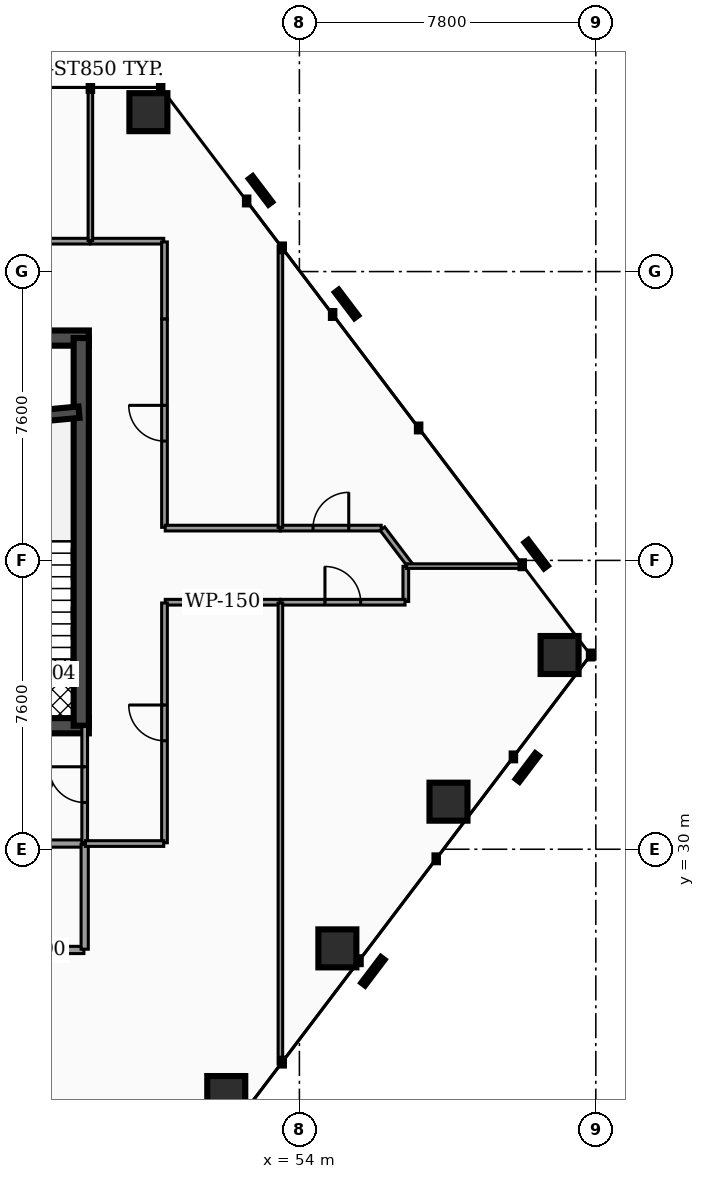
"""IFC4 building model, lengths in metres.
Left out: names, types, materials, properties, quantities, classifications, styles, units other than length and angle.
Written with IfcOpenShell. Run it as: python <this file> out.ifc"""

import sys

from ifc_helpers import new_model, si_unit, direction, frame, frame_2d, origin, origin_2d, place, context, subcontext, project, spatial, rectangle, hollow_rectangle, extrude, element, fill, save


model = new_model("IFC4")
c1 = context("Model", 3, precision=1e-05, world=origin(), true_north=direction((0.0, 1.0)))
c2 = subcontext(c1, "Body", "Model", "MODEL_VIEW")
j1 = project(units=[si_unit("LENGTHUNIT", "METRE"), si_unit("PLANEANGLEUNIT", "RADIAN")], contexts=[c1])
p1 = place(None, origin())
s1 = spatial("IfcSite", under=j1, at=p1, CompositionType="ELEMENT")
p2 = place(p1, origin())
s2 = spatial("IfcBuilding", under=s1, at=p2, CompositionType="ELEMENT")
p3 = place(p2, frame((0.0, 0.0, 47.94)))
s3 = spatial("IfcBuildingStorey", under=s2, at=p3, CompositionType="ELEMENT", Elevation=47.94)
p4 = place(p3, frame((28.4, 43.45, 0.0), z_axis=(0.0, 0.0, 1.0), x_axis=(1.0, 0.0, 0.0)))
e1 = element("IfcWall", 1, at=p4, inside=s3, PredefinedType="SHEAR", context=c2, shape_type="SweptSolid", body=[
    extrude(rectangle(XDim=20.06, YDim=0.4, at=frame_2d((10.03, 0.0))), origin(), (0.0, 0.0, 1.0), 3.82),
])
p5 = place(p3, frame((28.4, 33.25, 0.0), z_axis=(0.0, 0.0, 1.0), x_axis=(1.0, 0.0, 0.0)))
e2 = element("IfcWall", 2, at=p5, inside=s3, PredefinedType="SHEAR", context=c2, shape_type="SweptSolid", body=[
    extrude(rectangle(XDim=20.06, YDim=0.4, at=frame_2d((10.03, 0.0))), origin(), (0.0, 0.0, 1.0), 3.82),
])
p6 = place(p5, frame((4.03, 0.0, 0.0)))
e3 = element("IfcOpeningElement", 3, at=p6, cuts=e2, PredefinedType="OPENING", context=c2, shape_type="SweptSolid", body=[
    extrude(rectangle(XDim=1.1, YDim=2.15, at=frame_2d((0.55, 1.075))), frame((0.0, 0.21, 0.0), z_axis=(0.0, -1.0, 0.0), x_axis=(1.0, 0.0, 0.0)), (0.0, 0.0, 1.0), 0.42),
])
p7 = place(p5, frame((14.87, 0.0, 0.0)))
e4 = element("IfcOpeningElement", 4, at=p7, cuts=e2, PredefinedType="OPENING", context=c2, shape_type="SweptSolid", body=[
    extrude(rectangle(XDim=1.1, YDim=2.15, at=frame_2d((0.55, 1.075))), frame((0.0, 0.21, 0.0), z_axis=(0.0, -1.0, 0.0), x_axis=(1.0, 0.0, 0.0)), (0.0, 0.0, 1.0), 0.42),
])
p8 = place(p5, frame((1.31, 0.0, 0.0)))
e5 = element("IfcOpeningElement", 5, at=p8, cuts=e2, PredefinedType="OPENING", context=c2, shape_type="SweptSolid", body=[
    extrude(rectangle(XDim=1.1, YDim=2.2, at=frame_2d((0.55, 1.1))), frame((0.0, 0.21, 0.0), z_axis=(0.0, -1.0, 0.0), x_axis=(1.0, 0.0, 0.0)), (0.0, 0.0, 1.0), 0.42),
])
p9 = place(p5, frame((9.44, 0.0, 0.0)))
e6 = element("IfcOpeningElement", 6, at=p9, cuts=e2, PredefinedType="OPENING", context=c2, shape_type="SweptSolid", body=[
    extrude(rectangle(XDim=1.12, YDim=2.05, at=frame_2d((0.56, 1.025))), frame((0.0, 0.21, 0.0), z_axis=(0.0, -1.0, 0.0), x_axis=(1.0, 0.0, 0.0)), (0.0, 0.0, 1.0), 0.42),
])
p10 = place(p5, frame((17.65, 0.0, 0.0)))
e7 = element("IfcOpeningElement", 7, at=p10, cuts=e2, PredefinedType="OPENING", context=c2, shape_type="SweptSolid", body=[
    extrude(rectangle(XDim=1.1, YDim=2.2, at=frame_2d((0.55, 1.1))), frame((0.0, 0.21, 0.0), z_axis=(0.0, -1.0, 0.0), x_axis=(1.0, 0.0, 0.0)), (0.0, 0.0, 1.0), 0.42),
])
p11 = place(p3, frame((48.26, 33.25, 0.0), z_axis=(0.0, 0.0, 1.0), x_axis=(0.0, 1.0, 0.0)))
e8 = element("IfcWall", 8, at=p11, inside=s3, PredefinedType="SHEAR", context=c2, shape_type="SweptSolid", body=[
    extrude(rectangle(XDim=10.2, YDim=0.4, at=frame_2d((5.1, 0.0))), origin(), (0.0, 0.0, 1.0), 3.82),
])
p12 = place(p3, frame((44.98, 41.2, 0.0), z_axis=(0.0, 0.0, 1.0), x_axis=(0.995686468965, 0.09278176286, 0.0)))
e9 = element("IfcWall", 9, at=p12, inside=s3, PredefinedType="SHEAR", context=c2, shape_type="SweptSolid", body=[
    extrude(rectangle(XDim=3.234, YDim=0.3, at=frame_2d((1.617, 0.0))), origin(), (0.0, 0.0, 1.0), 3.82),
])
p13 = place(p3, frame((50.026, 49.394, 0.0), z_axis=(0.14189700724, -0.030162599133, 0.989421779096), x_axis=(0.207921314521, 0.978145555103, 0.0)))
e10 = element("IfcColumn", 10, at=p13, inside=s3, PredefinedType="COLUMN", context=c2, shape_type="SweptSolid", body=[
    extrude(hollow_rectangle(XDim=1.0, YDim=1.0, WallThickness=0.05, at=origin_2d()), origin(), (0.0, 0.0, 1.0), 3.861),
])
p14 = place(p3, frame((52.075, 23.532, 0.0), z_axis=(-0.061492548254, -0.001913668514, 0.99810570802), x_axis=(0.031105273255, -0.999516113915, 0.0)))
e11 = element("IfcColumn", 11, at=p14, inside=s3, PredefinedType="COLUMN", context=c2, shape_type="SweptSolid", body=[
    extrude(hollow_rectangle(XDim=1.0, YDim=1.0, WallThickness=0.05, at=origin_2d()), origin(), (0.0, 0.0, 1.0), 3.827),
])
p15 = place(p3, frame((54.999, 27.392, 0.0), z_axis=(-0.031022365831, 0.038426881133, 0.998779749306), x_axis=(-0.778086956405, -0.628156579423, 0.0)))
e12 = element("IfcColumn", 12, at=p15, inside=s3, PredefinedType="COLUMN", context=c2, shape_type="SweptSolid", body=[
    extrude(hollow_rectangle(XDim=1.0, YDim=1.0, WallThickness=0.05, at=origin_2d()), origin(), (0.0, 0.0, 1.0), 3.825),
])
p16 = place(p3, frame((57.923, 31.251, 0.0), z_axis=(-0.000445987498, 0.078557512188, 0.996909483541), x_axis=(-0.999983885033, -0.005677118569, 0.0)))
e13 = element("IfcColumn", 13, at=p16, inside=s3, PredefinedType="COLUMN", context=c2, shape_type="SweptSolid", body=[
    extrude(hollow_rectangle(XDim=1.0, YDim=1.0, WallThickness=0.05, at=origin_2d()), origin(), (0.0, 0.0, 1.0), 3.832),
])
p17 = place(p3, frame((60.847, 35.111, 0.0), z_axis=(0.029813773145, 0.11817672206, 0.992544911475), x_axis=(-0.969619804891, 0.244616912667, 0.0)))
e14 = element("IfcColumn", 14, at=p17, inside=s3, PredefinedType="COLUMN", context=c2, shape_type="SweptSolid", body=[
    extrude(hollow_rectangle(XDim=1.0, YDim=1.0, WallThickness=0.05, at=origin_2d()), origin(), (0.0, 0.0, 1.0), 3.849),
])
p18 = place(p3, frame((45.385, 30.15, 0.0), z_axis=(0.0, 0.0, 1.0), x_axis=(1.0, 0.0, 0.0)))
e15 = element("IfcWall", 15, at=p18, inside=s3, PredefinedType="PARTITIONING", context=c2, shape_type="SweptSolid", body=[
    extrude(rectangle(XDim=2.945, YDim=0.19, at=frame_2d((1.473, 0.0))), origin(), (0.0, 0.0, 1.0), 2.777),
])
p19 = place(p18, frame((0.913, 0.0, 0.0)))
e16 = element("IfcOpeningElement", 16, at=p19, cuts=e15, PredefinedType="OPENING", context=c2, shape_type="SweptSolid", body=[
    extrude(rectangle(XDim=1.12, YDim=2.05, at=frame_2d((0.56, 1.025))), frame((0.0, 0.105, 0.0), z_axis=(0.0, -1.0, 0.0), x_axis=(1.0, 0.0, 0.0)), (0.0, 0.0, 1.0), 0.21),
])
p20 = place(p3, frame((48.35, 30.17, 0.0), z_axis=(0.0, 0.0, 1.0), x_axis=(0.0, 1.0, 0.0)))
e17 = element("IfcWall", 17, at=p20, inside=s3, PredefinedType="PARTITIONING", context=c2, shape_type="SweptSolid", body=[
    extrude(rectangle(XDim=3.06, YDim=0.15, at=frame_2d((1.53, 0.0))), origin(), (0.0, 0.0, 1.0), 2.777),
])
p21 = place(p20, frame((1.06, 0.0, 0.0)))
e18 = element("IfcOpeningElement", 18, at=p21, cuts=e17, PredefinedType="OPENING", context=c2, shape_type="SweptSolid", body=[
    extrude(rectangle(XDim=0.94, YDim=2.05, at=frame_2d((0.47, 1.025))), frame((0.0, 0.085, 0.0), z_axis=(0.0, -1.0, 0.0), x_axis=(1.0, 0.0, 0.0)), (0.0, 0.0, 1.0), 0.17),
])
p22 = place(p3, frame((45.4, 27.35, 0.0), z_axis=(0.0, 0.0, 1.0), x_axis=(1.0, 0.0, 0.0)))
e19 = element("IfcWall", 19, at=p22, inside=s3, PredefinedType="PARTITIONING", context=c2, shape_type="SweptSolid", body=[
    extrude(rectangle(XDim=2.93, YDim=0.19, at=frame_2d((1.465, 0.0))), origin(), (0.0, 0.0, 1.0), 2.777),
])
p23 = place(p3, frame((48.35, 27.37, 0.0), z_axis=(0.0, 0.0, 1.0), x_axis=(0.0, 1.0, 0.0)))
e20 = element("IfcWall", 20, at=p23, inside=s3, PredefinedType="PARTITIONING", context=c2, shape_type="SweptSolid", body=[
    extrude(rectangle(XDim=2.76, YDim=0.19, at=frame_2d((1.38, 0.0))), origin(), (0.0, 0.0, 1.0), 2.777),
])
p24 = place(p3, frame((50.47, 36.5, 0.0), z_axis=(0.0, 0.0, 1.0), x_axis=(1.0, 0.0, 0.0)))
e21 = element("IfcWall", 21, at=p24, inside=s3, PredefinedType="PARTITIONING", context=c2, shape_type="SweptSolid", body=[
    extrude(rectangle(XDim=3.025, YDim=0.15, at=frame_2d((1.513, 0.0))), origin(), (0.0, 0.0, 1.0), 2.777),
])
p25 = place(p3, frame((50.45, 30.17, 0.0), z_axis=(0.0, 0.0, 1.0), x_axis=(0.0, 1.0, 0.0)))
e22 = element("IfcWall", 22, at=p25, inside=s3, PredefinedType="PARTITIONING", context=c2, shape_type="SweptSolid", body=[
    extrude(rectangle(XDim=6.31, YDim=0.15, at=frame_2d((3.155, 0.0))), origin(), (0.0, 0.0, 1.0), 2.777),
])
p26 = place(p25, frame((2.685, 0.0, 0.0)))
e23 = element("IfcOpeningElement", 23, at=p26, cuts=e22, PredefinedType="OPENING", context=c2, shape_type="SweptSolid", body=[
    extrude(rectangle(XDim=0.94, YDim=2.05, at=frame_2d((0.47, 1.025))), frame((0.0, 0.085, 0.0), z_axis=(0.0, -1.0, 0.0), x_axis=(1.0, 0.0, 0.0)), (0.0, 0.0, 1.0), 0.17),
])
p27 = place(p3, frame((48.37, 30.15, 0.0), z_axis=(0.0, 0.0, 1.0), x_axis=(1.0, 0.0, 0.0)))
e24 = element("IfcWall", 24, at=p27, inside=s3, PredefinedType="PARTITIONING", context=c2, shape_type="SweptSolid", body=[
    extrude(rectangle(XDim=2.06, YDim=0.15, at=frame_2d((1.03, 0.0))), origin(), (0.0, 0.0, 1.0), 2.777),
])
p28 = place(p3, frame((56.8, 36.52, 0.0), z_axis=(0.0, 0.0, 1.0), x_axis=(0.0, 1.0, 0.0)))
e25 = element("IfcWall", 25, at=p28, inside=s3, PredefinedType="PARTITIONING", context=c2, shape_type="SweptSolid", body=[
    extrude(rectangle(XDim=0.925, YDim=0.15, at=frame_2d((0.462, 0.0))), origin(), (0.0, 0.0, 1.0), 2.777),
])
p29 = place(p3, frame((53.505, 36.5, 0.0), z_axis=(0.0, 0.0, 1.0), x_axis=(1.0, 0.0, 0.0)))
e26 = element("IfcWall", 26, at=p29, inside=s3, PredefinedType="PARTITIONING", context=c2, shape_type="SweptSolid", body=[
    extrude(rectangle(XDim=3.275, YDim=0.15, at=frame_2d((1.638, 0.0))), origin(), (0.0, 0.0, 1.0), 2.777),
])
p30 = place(p29, frame((1.167, 0.0, 0.0)))
e27 = element("IfcOpeningElement", 27, at=p30, cuts=e26, PredefinedType="OPENING", context=c2, shape_type="SweptSolid", body=[
    extrude(rectangle(XDim=0.94, YDim=2.05, at=frame_2d((0.47, 1.025))), frame((0.0, 0.085, 0.0), z_axis=(0.0, -1.0, 0.0), x_axis=(1.0, 0.0, 0.0)), (0.0, 0.0, 1.0), 0.17),
])
p31 = place(p3, frame((53.505, 38.45, 0.0), z_axis=(0.0, 0.0, 1.0), x_axis=(1.0, 0.0, 0.0)))
e28 = element("IfcWall", 28, at=p31, inside=s3, PredefinedType="PARTITIONING", context=c2, shape_type="SweptSolid", body=[
    extrude(rectangle(XDim=2.647, YDim=0.15, at=frame_2d((1.324, 0.0))), origin(), (0.0, 0.0, 1.0), 2.777),
])
p32 = place(p31, frame((0.854, 0.0, 0.0)))
e29 = element("IfcOpeningElement", 29, at=p32, cuts=e28, PredefinedType="OPENING", context=c2, shape_type="SweptSolid", body=[
    extrude(rectangle(XDim=0.94, YDim=2.05, at=frame_2d((0.47, 1.025))), frame((0.0, 0.085, 0.0), z_axis=(0.0, -1.0, 0.0), x_axis=(1.0, 0.0, 0.0)), (0.0, 0.0, 1.0), 0.17),
])
p33 = place(p3, frame((56.184, 38.434, 0.0), z_axis=(0.0, 0.0, 1.0), x_axis=(0.603900079305, -0.797060031751, 0.0)))
e30 = element("IfcWall", 30, at=p33, inside=s3, PredefinedType="PARTITIONING", context=c2, shape_type="SweptSolid", body=[
    extrude(rectangle(XDim=1.22, YDim=0.15, at=frame_2d((0.61, 0.0))), origin(), (0.0, 0.0, 1.0), 2.777),
])
p34 = place(p3, frame((48.505, 46.0, 0.0), z_axis=(0.0, 0.0, 1.0), x_axis=(1.0, 0.0, 0.0)))
e31 = element("IfcWall", 31, at=p34, inside=s3, PredefinedType="PARTITIONING", context=c2, shape_type="SweptSolid", body=[
    extrude(rectangle(XDim=1.925, YDim=0.15, at=frame_2d((0.962, 0.0))), origin(), (0.0, 0.0, 1.0), 2.777),
])
p35 = place(p3, frame((50.45, 43.95, 0.0), z_axis=(0.0, 0.0, 1.0), x_axis=(0.0, 1.0, 0.0)))
e32 = element("IfcWall", 32, at=p35, inside=s3, PredefinedType="PARTITIONING", context=c2, shape_type="SweptSolid", body=[
    extrude(rectangle(XDim=2.03, YDim=0.15, at=frame_2d((1.015, 0.0))), origin(), (0.0, 0.0, 1.0), 2.777),
])
p36 = place(p3, frame((50.45, 38.47, 0.0), z_axis=(0.0, 0.0, 1.0), x_axis=(0.0, 1.0, 0.0)))
e33 = element("IfcWall", 33, at=p36, inside=s3, PredefinedType="PARTITIONING", context=c2, shape_type="SweptSolid", body=[
    extrude(rectangle(XDim=5.48, YDim=0.15, at=frame_2d((2.74, 0.0))), origin(), (0.0, 0.0, 1.0), 2.777),
])
p37 = place(p36, frame((2.27, 0.0, 0.0)))
e34 = element("IfcOpeningElement", 34, at=p37, cuts=e33, PredefinedType="OPENING", context=c2, shape_type="SweptSolid", body=[
    extrude(rectangle(XDim=0.94, YDim=2.05, at=frame_2d((0.47, 1.025))), frame((0.0, 0.085, 0.0), z_axis=(0.0, -1.0, 0.0), x_axis=(1.0, 0.0, 0.0)), (0.0, 0.0, 1.0), 0.17),
])
p38 = place(p3, frame((50.47, 38.45, 0.0), z_axis=(0.0, 0.0, 1.0), x_axis=(1.0, 0.0, 0.0)))
e35 = element("IfcWall", 35, at=p38, inside=s3, PredefinedType="PARTITIONING", context=c2, shape_type="SweptSolid", body=[
    extrude(rectangle(XDim=3.025, YDim=0.15, at=frame_2d((1.513, 0.0))), origin(), (0.0, 0.0, 1.0), 2.777),
])
p39 = place(p3, frame((42.605, 46.0, 0.0), z_axis=(0.0, 0.0, 1.0), x_axis=(1.0, 0.0, 0.0)))
e36 = element("IfcWall", 36, at=p39, inside=s3, PredefinedType="PARTITIONING", context=c2, shape_type="SweptSolid", body=[
    extrude(rectangle(XDim=5.88, YDim=0.15, at=frame_2d((2.94, 0.0))), origin(), (0.0, 0.0, 1.0), 2.777),
])
p40 = place(p39, frame((2.47, 0.0, 0.0)))
e37 = element("IfcOpeningElement", 37, at=p40, cuts=e36, PredefinedType="OPENING", context=c2, shape_type="SweptSolid", body=[
    extrude(rectangle(XDim=0.94, YDim=2.05, at=frame_2d((0.47, 1.025))), frame((0.0, 0.085, 0.0), z_axis=(0.0, -1.0, 0.0), x_axis=(1.0, 0.0, 0.0)), (0.0, 0.0, 1.0), 0.17),
])
p41 = place(p3, frame((53.5, 24.351, 0.0), z_axis=(0.0, 0.0, 1.0), x_axis=(0.0, 1.0, 0.0)))
e38 = element("IfcWall", 38, at=p41, inside=s3, PredefinedType="PARTITIONING", context=c2, shape_type="SweptSolid", body=[
    extrude(rectangle(XDim=12.129, YDim=0.12, at=frame_2d((6.064, 0.0))), origin(), (0.0, 0.0, 1.0), 2.777),
])
p42 = place(p3, frame((56.82, 37.45, 0.0), z_axis=(0.0, 0.0, 1.0), x_axis=(1.0, 0.0, 0.0)))
e39 = element("IfcWall", 39, at=p42, inside=s3, PredefinedType="PARTITIONING", context=c2, shape_type="SweptSolid", body=[
    extrude(rectangle(XDim=3.055, YDim=0.12, at=frame_2d((1.528, 0.0))), origin(), (0.0, 0.0, 1.0), 2.777),
])
p43 = place(p3, frame((53.5, 38.47, 0.0), z_axis=(0.0, 0.0, 1.0), x_axis=(0.0, 1.0, 0.0)))
e40 = element("IfcWall", 40, at=p43, inside=s3, PredefinedType="PARTITIONING", context=c2, shape_type="SweptSolid", body=[
    extrude(rectangle(XDim=7.401, YDim=0.12, at=frame_2d((3.7, 0.0))), origin(), (0.0, 0.0, 1.0), 2.777),
])
p44 = place(p3, frame((48.5, 46.02, 0.0), z_axis=(0.0, 0.0, 1.0), x_axis=(0.0, 1.0, 0.0)))
e41 = element("IfcWall", 41, at=p44, inside=s3, PredefinedType="PARTITIONING", context=c2, shape_type="SweptSolid", body=[
    extrude(rectangle(XDim=4.009, YDim=0.12, at=frame_2d((2.005, 0.0))), origin(), (0.0, 0.0, 1.0), 2.777),
])
p45 = place(p21, origin())
e42 = element("IfcDoor", 42, at=p45, inside=s3, OperationType="SINGLE_SWING_RIGHT", PredefinedType="DOOR", context=c2, shape_type="SweptSolid", body=[
    extrude(rectangle(XDim=0.94, YDim=2.05, at=frame_2d((0.47, 1.025))), frame((0.0, 0.025, 0.0), z_axis=(0.0, -1.0, 0.0), x_axis=(1.0, 0.0, 0.0)), (0.0, 0.0, 1.0), 0.05),
])
fill(e18, e42)
p46 = place(p26, origin())
e43 = element("IfcDoor", 43, at=p46, inside=s3, OperationType="SINGLE_SWING_RIGHT", PredefinedType="DOOR", context=c2, shape_type="SweptSolid", body=[
    extrude(rectangle(XDim=0.94, YDim=2.05, at=frame_2d((0.47, 1.025))), frame((0.0, 0.025, 0.0), z_axis=(0.0, -1.0, 0.0), x_axis=(1.0, 0.0, 0.0)), (0.0, 0.0, 1.0), 0.05),
])
fill(e23, e43)
p47 = place(p30, origin())
e44 = element("IfcDoor", 44, at=p47, inside=s3, OperationType="SINGLE_SWING_LEFT", PredefinedType="DOOR", context=c2, shape_type="SweptSolid", body=[
    extrude(rectangle(XDim=0.94, YDim=2.05, at=frame_2d((0.47, 1.025))), frame((0.0, 0.025, 0.0), z_axis=(0.0, -1.0, 0.0), x_axis=(1.0, 0.0, 0.0)), (0.0, 0.0, 1.0), 0.05),
])
fill(e27, e44)
p48 = place(p32, origin())
e45 = element("IfcDoor", 45, at=p48, inside=s3, OperationType="SINGLE_SWING_RIGHT", PredefinedType="DOOR", context=c2, shape_type="SweptSolid", body=[
    extrude(rectangle(XDim=0.94, YDim=2.05, at=frame_2d((0.47, 1.025))), frame((0.0, 0.025, 0.0), z_axis=(0.0, -1.0, 0.0), x_axis=(1.0, 0.0, 0.0)), (0.0, 0.0, 1.0), 0.05),
])
fill(e29, e45)
p49 = place(p37, origin())
e46 = element("IfcDoor", 46, at=p49, inside=s3, OperationType="SINGLE_SWING_RIGHT", PredefinedType="DOOR", context=c2, shape_type="SweptSolid", body=[
    extrude(rectangle(XDim=0.94, YDim=2.05, at=frame_2d((0.47, 1.025))), frame((0.0, 0.025, 0.0), z_axis=(0.0, -1.0, 0.0), x_axis=(1.0, 0.0, 0.0)), (0.0, 0.0, 1.0), 0.05),
])
fill(e34, e46)
save(model, sys.argv[1])
